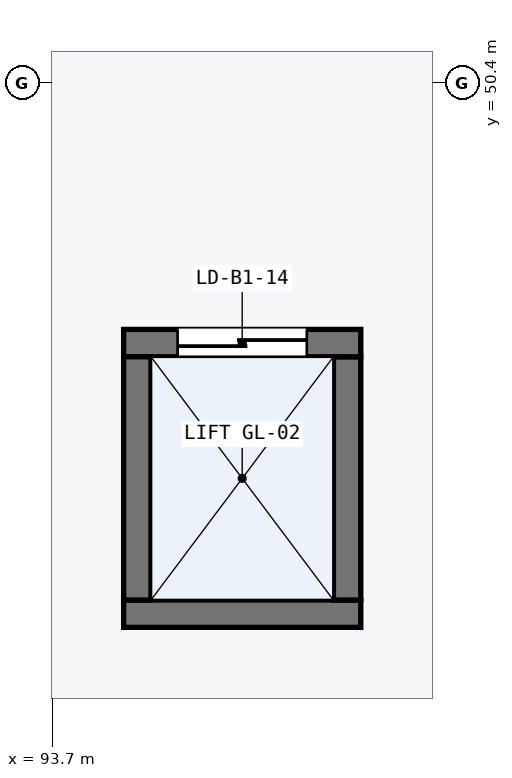
"""IFC4 building model, lengths in metres.
Left out: names, types, materials, properties, quantities, classifications, styles, units other than length and angle.
Written with IfcOpenShell. Run it as: python <this file> out.ifc"""

import sys

from ifc_helpers import new_model, si_unit, direction, frame, frame_2d, origin, place, context, subcontext, project, spatial, rectangle, extrude, element, fill, save


model = new_model("IFC4")
c1 = context("Model", 3, precision=1e-05, world=origin(), true_north=direction((0.0, 1.0)))
c2 = subcontext(c1, "Body", "Model", "MODEL_VIEW")
j1 = project(units=[si_unit("LENGTHUNIT", "METRE"), si_unit("PLANEANGLEUNIT", "RADIAN")], contexts=[c1])
p1 = place(None, origin())
s1 = spatial("IfcSite", under=j1, at=p1, CompositionType="ELEMENT")
p2 = place(p1, origin())
s2 = spatial("IfcBuilding", under=s1, at=p2, CompositionType="ELEMENT")
p3 = place(p2, frame((0.0, 0.0, -5.4)))
s3 = spatial("IfcBuildingStorey", under=s2, at=p3, CompositionType="ELEMENT", Elevation=-5.4)
p4 = place(p3, frame((94.64, 43.42, 0.0), z_axis=(0.0, 0.0, 1.0), x_axis=(1.0, 0.0, 0.0)))
e1 = element("IfcWall", 1, at=p4, inside=s3, PredefinedType="SHEAR", context=c2, shape_type="SweptSolid", body=[
    extrude(rectangle(XDim=3.12, YDim=0.36, at=frame_2d((1.56, 0.0))), origin(), (0.0, 0.0, 1.0), 5.145),
])
p5 = place(p3, frame((97.58, 43.6, 0.0), z_axis=(0.0, 0.0, 1.0), x_axis=(0.0, 1.0, 0.0)))
e2 = element("IfcWall", 2, at=p5, inside=s3, PredefinedType="SHEAR", context=c2, shape_type="SweptSolid", body=[
    extrude(rectangle(XDim=3.2, YDim=0.36, at=frame_2d((1.6, 0.0))), origin(), (0.0, 0.0, 1.0), 5.145),
])
p6 = place(p3, frame((97.76, 46.98, 0.0), z_axis=(0.0, 0.0, 1.0), x_axis=(-1.0, 0.0, 0.0)))
e3 = element("IfcWall", 3, at=p6, inside=s3, PredefinedType="SHEAR", context=c2, shape_type="SweptSolid", body=[
    extrude(rectangle(XDim=3.12, YDim=0.36, at=frame_2d((1.56, 0.0))), origin(), (0.0, 0.0, 1.0), 5.145),
])
p7 = place(p6, frame((0.71, 0.0, 0.0)))
e4 = element("IfcOpeningElement", 4, at=p7, cuts=e3, PredefinedType="OPENING", context=c2, shape_type="SweptSolid", body=[
    extrude(rectangle(XDim=1.7, YDim=2.3, at=frame_2d((0.85, 1.15))), frame((0.0, 0.19, 0.0), z_axis=(0.0, -1.0, 0.0), x_axis=(1.0, 0.0, 0.0)), (0.0, 0.0, 1.0), 0.38),
])
p8 = place(p3, frame((94.82, 46.8, 0.0), z_axis=(0.0, 0.0, 1.0), x_axis=(0.0, -1.0, 0.0)))
e5 = element("IfcWall", 5, at=p8, inside=s3, PredefinedType="SHEAR", context=c2, shape_type="SweptSolid", body=[
    extrude(rectangle(XDim=3.2, YDim=0.36, at=frame_2d((1.6, 0.0))), origin(), (0.0, 0.0, 1.0), 5.145),
])
p9 = place(p7, frame((1.7, 0.0, 0.0), z_axis=(0.0, 0.0, 1.0), x_axis=(-1.0, 0.0, 0.0)))
e6 = element("IfcDoor", 6, at=p9, inside=s3, OperationType="DOUBLE_DOOR_SLIDING", PredefinedType="DOOR", context=c2, shape_type="SweptSolid", body=[
    extrude(rectangle(XDim=1.7, YDim=2.3, at=frame_2d((0.85, 1.15))), frame((0.0, 0.025, 0.0), z_axis=(0.0, -1.0, 0.0), x_axis=(1.0, 0.0, 0.0)), (0.0, 0.0, 1.0), 0.05),
])
fill(e4, e6)
save(model, sys.argv[1])
